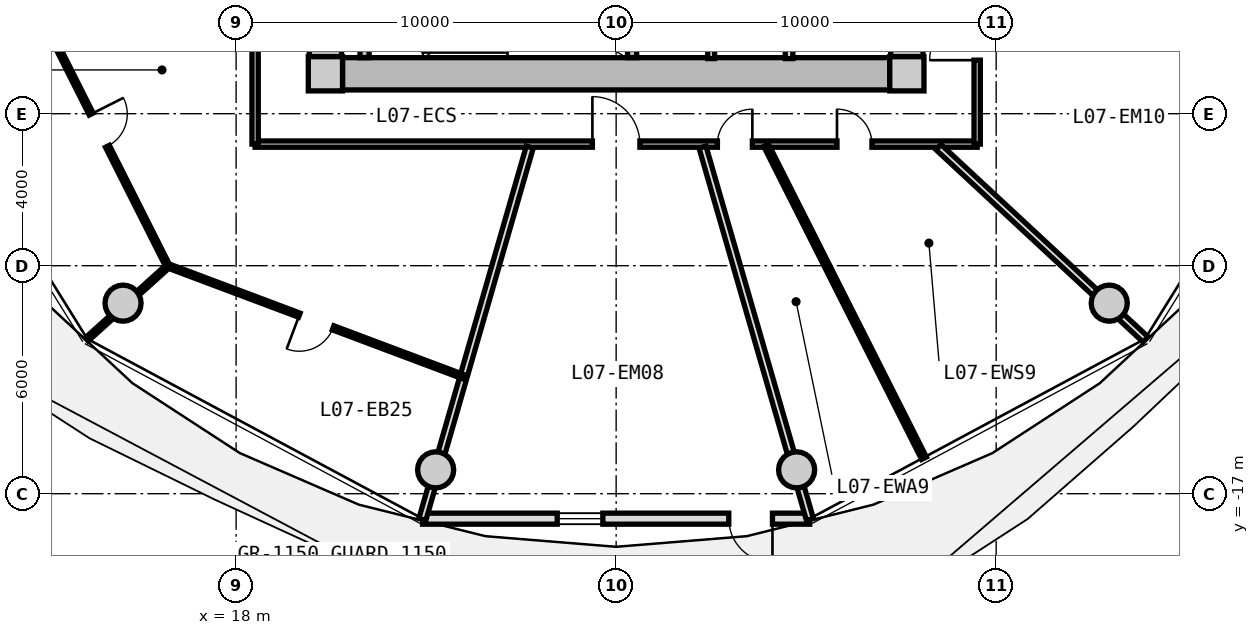
"""IFC4 building model, lengths in metres.
Left out: names, types, materials, properties, quantities, classifications, styles, units other than length and angle.
Written with IfcOpenShell. Run it as: python <this file> out.ifc"""

import sys

from ifc_helpers import new_model, si_unit, direction, frame, frame_2d, origin, origin_2d, place, context, subcontext, project, spatial, rectangle, circle, extrude, source, transform, mapped, element, fill, save


model = new_model("IFC4")
c1 = context("Model", 3, precision=1e-05, world=origin(), true_north=direction((0.0, 1.0)))
c2 = subcontext(c1, "Body", "Model", "MODEL_VIEW")
j1 = project(units=[si_unit("LENGTHUNIT", "METRE"), si_unit("PLANEANGLEUNIT", "RADIAN")], contexts=[c1])
p1 = place(None, origin())
s1 = spatial("IfcSite", under=j1, at=p1, CompositionType="ELEMENT")
p2 = place(p1, origin())
s2 = spatial("IfcBuilding", under=s1, at=p2, CompositionType="ELEMENT")
p3 = place(p2, frame((0.0, 0.0, 27.7)))
s3 = spatial("IfcBuildingStorey", under=s2, at=p3, CompositionType="ELEMENT", Elevation=27.7)
m1 = source(origin(), c2, "Body", "SweptSolid", [
    extrude(rectangle(XDim=0.9, YDim=0.9, at=origin_2d()), origin(), (0.0, 0.0, 1.0), 3.05),
])
for number, where, z_axis, x_axis in (
    (1, (20.35, -5.95, 0.0), (0.0, 0.0, 1.0), (1.0, 0.0, 0.0)),
    (2, (35.65, -5.95, 0.0), (0.0, 0.0, 1.0), (1.0, 0.0, 0.0)),
):
    element("IfcColumn", number, at=place(p3, frame(where, z_axis=z_axis, x_axis=x_axis)), inside=s3, PredefinedType="COLUMN", context=c2, shape_type="MappedRepresentation", body=[
        mapped(m1, transform((0.0, 0.0, 0.0), x_axis=(1.0, 0.0, 0.0), y_axis=(0.0, 1.0, 0.0), z_axis=(0.0, 0.0, 1.0), scale=1.0)),
    ])
m2 = source(origin(), c2, "Body", "SweptSolid", [
    extrude(rectangle(XDim=14.4, YDim=0.85, at=frame_2d((7.2, 0.0))), origin(), (0.0, 0.0, 1.0), 2.79),
])
p4 = place(p3, frame((35.2, -5.95, 0.0), z_axis=(0.0, 0.0, 1.0), x_axis=(-1.0, 0.0, 0.0)))
e3 = element("IfcWall", 3, at=p4, inside=s3, PredefinedType="SHEAR", context=c2, shape_type="MappedRepresentation", body=[
    mapped(m2, transform((0.0, 0.0, 0.0), x_axis=(1.0, 0.0, 0.0), y_axis=(0.0, 1.0, 0.0), z_axis=(0.0, 0.0, 1.0), scale=1.0)),
])
m3 = source(origin(), c2, "Body", "SweptSolid", [
    extrude(rectangle(XDim=11.0, YDim=0.85, at=frame_2d((5.5, 0.0))), origin(), (0.0, 0.0, 1.0), 2.79),
])
p5 = place(p3, frame((20.35, -5.5, 0.0), z_axis=(0.0, 0.0, 1.0), x_axis=(0.0, 1.0, 0.0)))
e4 = element("IfcWall", 4, at=p5, inside=s3, PredefinedType="SHEAR", context=c2, shape_type="MappedRepresentation", body=[
    mapped(m3, transform((0.0, 0.0, 0.0), x_axis=(1.0, 0.0, 0.0), y_axis=(0.0, 1.0, 0.0), z_axis=(0.0, 0.0, 1.0), scale=1.0)),
])
p6 = place(p5, frame((3.8, 0.0, 0.0)))
e5 = element("IfcOpeningElement", 5, at=p6, cuts=e4, PredefinedType="OPENING", context=c2, shape_type="SweptSolid", body=[
    extrude(rectangle(XDim=1.2, YDim=2.15, at=frame_2d((0.6, 1.075))), frame((0.0, 0.435, 0.0), z_axis=(0.0, -1.0, 0.0), x_axis=(1.0, 0.0, 0.0)), (0.0, 0.0, 1.0), 0.87),
])
p7 = place(p3, frame((35.65, 5.5, 0.0), z_axis=(0.0, 0.0, 1.0), x_axis=(0.0, -1.0, 0.0)))
e6 = element("IfcWall", 6, at=p7, inside=s3, PredefinedType="SHEAR", context=c2, shape_type="MappedRepresentation", body=[
    mapped(m3, transform((0.0, 0.0, 0.0), x_axis=(1.0, 0.0, 0.0), y_axis=(0.0, 1.0, 0.0), z_axis=(0.0, 0.0, 1.0), scale=1.0)),
])
p8 = place(p7, frame((5.65, 0.0, 0.0)))
e7 = element("IfcOpeningElement", 7, at=p8, cuts=e6, PredefinedType="OPENING", context=c2, shape_type="SweptSolid", body=[
    extrude(rectangle(XDim=1.2, YDim=2.15, at=frame_2d((0.6, 1.075))), frame((0.0, 0.435, 0.0), z_axis=(0.0, -1.0, 0.0), x_axis=(1.0, 0.0, 0.0)), (0.0, 0.0, 1.0), 0.87),
])
m4 = source(origin(), c2, "Body", "SweptSolid", [
    extrude(circle(Radius=0.475, at=origin_2d()), origin(), (0.0, 0.0, 1.0), 3.05),
])
for number, where, z_axis, x_axis in (
    (8, (15.025, -11.985, 0.0), (0.0, 0.0, 1.0), (1.0, 0.0, 0.0)),
    (9, (23.251, -16.373, 0.0), (0.0, 0.0, 1.0), (1.0, 0.0, 0.0)),
    (10, (32.749, -16.373, 0.0), (0.0, 0.0, 1.0), (1.0, 0.0, 0.0)),
    (11, (40.975, -11.985, 0.0), (0.0, 0.0, 1.0), (1.0, 0.0, 0.0)),
):
    element("IfcColumn", number, at=place(p3, frame(where, z_axis=z_axis, x_axis=x_axis)), inside=s3, PredefinedType="COLUMN", context=c2, shape_type="MappedRepresentation", body=[
        mapped(m4, transform((0.0, 0.0, 0.0), x_axis=(1.0, 0.0, 0.0), y_axis=(0.0, 1.0, 0.0), z_axis=(0.0, 0.0, 1.0), scale=1.0)),
    ])
m5 = source(origin(), c2, "Body", "SweptSolid", [
    extrude(rectangle(XDim=10.187, YDim=0.29, at=frame_2d((5.094, 0.0))), origin(), (0.0, 0.0, 1.0), 2.79),
])
p9 = place(p3, frame((33.094, -17.657, 0.0), z_axis=(0.0, 0.0, 1.0), x_axis=(-1.0, 0.0, 0.0)))
e12 = element("IfcWall", 12, at=p9, inside=s3, PredefinedType="SOLIDWALL", context=c2, shape_type="MappedRepresentation", body=[
    mapped(m5, transform((0.0, 0.0, 0.0), x_axis=(1.0, 0.0, 0.0), y_axis=(0.0, 1.0, 0.0), z_axis=(0.0, 0.0, 1.0), scale=1.0)),
])
p10 = place(p9, frame((0.98, 0.0, 0.0)))
e13 = element("IfcOpeningElement", 13, at=p10, cuts=e12, PredefinedType="OPENING", context=c2, shape_type="SweptSolid", body=[
    extrude(rectangle(XDim=1.15, YDim=2.25, at=frame_2d((0.575, 1.125))), frame((0.0, 0.155, 0.0), z_axis=(0.0, -1.0, 0.0), x_axis=(1.0, 0.0, 0.0)), (0.0, 0.0, 1.0), 0.31),
])
p11 = place(p9, frame((5.444, 0.0, 0.85)))
e14 = element("IfcOpeningElement", 14, at=p11, cuts=e12, PredefinedType="OPENING", context=c2, shape_type="SweptSolid", body=[
    extrude(rectangle(XDim=1.2, YDim=1.5, at=frame_2d((0.6, 0.75))), frame((0.0, 0.155, 0.0), z_axis=(0.0, -1.0, 0.0), x_axis=(1.0, 0.0, 0.0)), (0.0, 0.0, 1.0), 0.31),
])
m6 = source(origin(), c2, "Body", "SweptSolid", [
    extrude(rectangle(XDim=3.075, YDim=0.24, at=frame_2d((1.538, 0.0))), origin(), (0.0, 0.0, 1.0), 2.79),
])
for number, where, z_axis, x_axis in (
    (15, (21.38, -5.525, 0.0), (0.0, 0.0, 1.0), (0.0, 1.0, 0.0)),
    (16, (28.42, -5.525, 0.0), (0.0, 0.0, 1.0), (0.0, 1.0, 0.0)),
):
    element("IfcWall", number, at=place(p3, frame(where, z_axis=z_axis, x_axis=x_axis)), inside=s3, PredefinedType="PARTITIONING", context=c2, shape_type="MappedRepresentation", body=[
        mapped(m6, transform((0.0, 0.0, 0.0), x_axis=(1.0, 0.0, 0.0), y_axis=(0.0, 1.0, 0.0), z_axis=(0.0, 0.0, 1.0), scale=1.0)),
    ])
m7 = source(origin(), c2, "Body", "SweptSolid", [
    extrude(rectangle(XDim=3.8, YDim=0.2, at=frame_2d((1.9, 0.0))), origin(), (0.0, 0.0, 1.0), 2.775),
])
p12 = place(p3, frame((32.55, -5.55, 0.0), z_axis=(0.0, 0.0, 1.0), x_axis=(0.0, 1.0, 0.0)))
e17 = element("IfcWall", 17, at=p12, inside=s3, PredefinedType="PARTITIONING", context=c2, shape_type="MappedRepresentation", body=[
    mapped(m7, transform((0.0, 0.0, 0.0), x_axis=(1.0, 0.0, 0.0), y_axis=(0.0, 1.0, 0.0), z_axis=(0.0, 0.0, 1.0), scale=1.0)),
])
m8 = source(origin(), c2, "Body", "SweptSolid", [
    extrude(rectangle(XDim=3.22, YDim=0.18, at=frame_2d((1.61, 0.0))), origin(), (0.0, 0.0, 1.0), 2.775),
])
p13 = place(p3, frame((30.5, -5.55, 0.0), z_axis=(0.0, 0.0, 1.0), x_axis=(0.0, 1.0, 0.0)))
e18 = element("IfcWall", 18, at=p13, inside=s3, PredefinedType="PARTITIONING", context=c2, shape_type="MappedRepresentation", body=[
    mapped(m8, transform((0.0, 0.0, 0.0), x_axis=(1.0, 0.0, 0.0), y_axis=(0.0, 1.0, 0.0), z_axis=(0.0, 0.0, 1.0), scale=1.0)),
])
m9 = source(origin(), c2, "Body", "SweptSolid", [
    extrude(rectangle(XDim=19.0, YDim=0.165, at=frame_2d((9.5, 0.0))), origin(), (0.0, 0.0, 1.0), 2.775),
])
p14 = place(p3, frame((37.5, -7.8, 0.0), z_axis=(0.0, 0.0, 1.0), x_axis=(-1.0, 0.0, 0.0)))
e19 = element("IfcWall", 19, at=p14, inside=s3, PredefinedType="PARTITIONING", context=c2, shape_type="MappedRepresentation", body=[
    mapped(m9, transform((0.0, 0.0, 0.0), x_axis=(1.0, 0.0, 0.0), y_axis=(0.0, 1.0, 0.0), z_axis=(0.0, 0.0, 1.0), scale=1.0)),
])
p15 = place(p14, frame((8.875, 0.0, 0.0)))
e20 = element("IfcOpeningElement", 20, at=p15, cuts=e19, PredefinedType="OPENING", context=c2, shape_type="SweptSolid", body=[
    extrude(rectangle(XDim=1.25, YDim=2.2, at=frame_2d((0.625, 1.1))), frame((0.0, 0.093, 0.0), z_axis=(0.0, -1.0, 0.0), x_axis=(1.0, 0.0, 0.0)), (0.0, 0.0, 1.0), 0.185),
])
p16 = place(p14, frame((5.915, 0.0, 0.0)))
e21 = element("IfcOpeningElement", 21, at=p16, cuts=e19, PredefinedType="OPENING", context=c2, shape_type="SweptSolid", body=[
    extrude(rectangle(XDim=0.92, YDim=2.1, at=frame_2d((0.46, 1.05))), frame((0.0, 0.093, 0.0), z_axis=(0.0, -1.0, 0.0), x_axis=(1.0, 0.0, 0.0)), (0.0, 0.0, 1.0), 0.185),
])
p17 = place(p14, frame((2.769, 0.0, 0.0)))
e22 = element("IfcOpeningElement", 22, at=p17, cuts=e19, PredefinedType="OPENING", context=c2, shape_type="SweptSolid", body=[
    extrude(rectangle(XDim=0.92, YDim=2.1, at=frame_2d((0.46, 1.05))), frame((0.0, 0.093, 0.0), z_axis=(0.0, -1.0, 0.0), x_axis=(1.0, 0.0, 0.0)), (0.0, 0.0, 1.0), 0.185),
])
m10 = source(origin(), c2, "Body", "SweptSolid", [
    extrude(rectangle(XDim=15.6, YDim=0.165, at=frame_2d((7.8, 0.0))), origin(), (0.0, 0.0, 1.0), 2.775),
])
p18 = place(p3, frame((18.5, -7.8, 0.0), z_axis=(0.0, 0.0, 1.0), x_axis=(0.0, 1.0, 0.0)))
e23 = element("IfcWall", 23, at=p18, inside=s3, PredefinedType="PARTITIONING", context=c2, shape_type="MappedRepresentation", body=[
    mapped(m10, transform((0.0, 0.0, 0.0), x_axis=(1.0, 0.0, 0.0), y_axis=(0.0, 1.0, 0.0), z_axis=(0.0, 0.0, 1.0), scale=1.0)),
])
p19 = place(p18, frame((12.241, 0.0, 0.0)))
e24 = element("IfcOpeningElement", 24, at=p19, cuts=e23, PredefinedType="OPENING", context=c2, shape_type="SweptSolid", body=[
    extrude(rectangle(XDim=1.05, YDim=2.15, at=frame_2d((0.525, 1.075))), frame((0.0, 0.093, 0.0), z_axis=(0.0, -1.0, 0.0), x_axis=(1.0, 0.0, 0.0)), (0.0, 0.0, 1.0), 0.185),
])
p20 = place(p18, frame((3.63, 0.0, 0.0)))
e25 = element("IfcOpeningElement", 25, at=p20, cuts=e23, PredefinedType="OPENING", context=c2, shape_type="SweptSolid", body=[
    extrude(rectangle(XDim=1.05, YDim=2.15, at=frame_2d((0.525, 1.075))), frame((0.0, 0.093, 0.0), z_axis=(0.0, -1.0, 0.0), x_axis=(1.0, 0.0, 0.0)), (0.0, 0.0, 1.0), 0.185),
])
p21 = place(p3, frame((37.5, 7.8, 0.0), z_axis=(0.0, 0.0, 1.0), x_axis=(0.0, -1.0, 0.0)))
e26 = element("IfcWall", 26, at=p21, inside=s3, PredefinedType="PARTITIONING", context=c2, shape_type="MappedRepresentation", body=[
    mapped(m10, transform((0.0, 0.0, 0.0), x_axis=(1.0, 0.0, 0.0), y_axis=(0.0, 1.0, 0.0), z_axis=(0.0, 0.0, 1.0), scale=1.0)),
])
p22 = place(p21, frame((12.141, 0.0, 0.0)))
e27 = element("IfcOpeningElement", 27, at=p22, cuts=e26, PredefinedType="OPENING", context=c2, shape_type="SweptSolid", body=[
    extrude(rectangle(XDim=1.25, YDim=2.2, at=frame_2d((0.625, 1.1))), frame((0.0, 0.093, 0.0), z_axis=(0.0, -1.0, 0.0), x_axis=(1.0, 0.0, 0.0)), (0.0, 0.0, 1.0), 0.185),
])
p23 = place(p21, frame((6.196, 0.0, 0.0)))
e28 = element("IfcOpeningElement", 28, at=p23, cuts=e26, PredefinedType="OPENING", context=c2, shape_type="SweptSolid", body=[
    extrude(rectangle(XDim=1.05, YDim=2.15, at=frame_2d((0.525, 1.075))), frame((0.0, 0.093, 0.0), z_axis=(0.0, -1.0, 0.0), x_axis=(1.0, 0.0, 0.0)), (0.0, 0.0, 1.0), 0.185),
])
p24 = place(p21, frame((1.092, 0.0, 0.0)))
e29 = element("IfcOpeningElement", 29, at=p24, cuts=e26, PredefinedType="OPENING", context=c2, shape_type="SweptSolid", body=[
    extrude(rectangle(XDim=1.05, YDim=2.15, at=frame_2d((0.525, 1.075))), frame((0.0, 0.093, 0.0), z_axis=(0.0, -1.0, 0.0), x_axis=(1.0, 0.0, 0.0)), (0.0, 0.0, 1.0), 0.185),
])
m11 = source(origin(), c2, "Body", "SweptSolid", [
    extrude(rectangle(XDim=10.196, YDim=0.19, at=frame_2d((5.098, 0.0))), origin(), (0.0, 0.0, 1.0), 2.225),
])
p25 = place(p3, frame((25.727, -7.88, 0.0), z_axis=(0.0, 0.0, 1.0), x_axis=(-0.277136420347, -0.960830580549, 0.0)))
e30 = element("IfcWall", 30, at=p25, inside=s3, PredefinedType="PARTITIONING", context=c2, shape_type="MappedRepresentation", body=[
    mapped(m11, transform((0.0, 0.0, 0.0), x_axis=(1.0, 0.0, 0.0), y_axis=(0.0, 1.0, 0.0), z_axis=(0.0, 0.0, 1.0), scale=1.0)),
])
m12 = source(origin(), c2, "Body", "SweptSolid", [
    extrude(rectangle(XDim=8.018, YDim=0.115, at=frame_2d((4.009, 0.0))), origin(), (0.0, 0.0, 1.0), 2.775),
])
p26 = place(p3, frame((12.596, -3.854, 0.0), z_axis=(0.0, 0.0, 1.0), x_axis=(0.450134355233, -0.89296084026, 0.0)))
e31 = element("IfcWall", 31, at=p26, inside=s3, PredefinedType="PARTITIONING", context=c2, shape_type="MappedRepresentation", body=[
    mapped(m12, transform((0.0, 0.0, 0.0), x_axis=(1.0, 0.0, 0.0), y_axis=(0.0, 1.0, 0.0), z_axis=(0.0, 0.0, 1.0), scale=1.0)),
])
p27 = place(p26, frame((3.534, 0.0, 0.0)))
e32 = element("IfcOpeningElement", 32, at=p27, cuts=e31, PredefinedType="OPENING", context=c2, shape_type="SweptSolid", body=[
    extrude(rectangle(XDim=0.95, YDim=2.1, at=frame_2d((0.475, 1.05))), frame((0.0, 0.067, 0.0), z_axis=(0.0, -1.0, 0.0), x_axis=(1.0, 0.0, 0.0)), (0.0, 0.0, 1.0), 0.135),
])
m13 = source(origin(), c2, "Body", "SweptSolid", [
    extrude(rectangle(XDim=8.32, YDim=0.115, at=frame_2d((4.16, 0.0))), origin(), (0.0, 0.0, 1.0), 2.775),
])
p28 = place(p3, frame((16.214, -11.006, 0.0), z_axis=(0.0, 0.0, 1.0), x_axis=(0.936180763098, -0.351518959382, 0.0)))
e33 = element("IfcWall", 33, at=p28, inside=s3, PredefinedType="PARTITIONING", context=c2, shape_type="MappedRepresentation", body=[
    mapped(m13, transform((0.0, 0.0, 0.0), x_axis=(1.0, 0.0, 0.0), y_axis=(0.0, 1.0, 0.0), z_axis=(0.0, 0.0, 1.0), scale=1.0)),
])
p29 = place(p28, frame((3.685, 0.0, 0.0)))
e34 = element("IfcOpeningElement", 34, at=p29, cuts=e33, PredefinedType="OPENING", context=c2, shape_type="SweptSolid", body=[
    extrude(rectangle(XDim=0.95, YDim=2.1, at=frame_2d((0.475, 1.05))), frame((0.0, 0.067, 0.0), z_axis=(0.0, -1.0, 0.0), x_axis=(1.0, 0.0, 0.0)), (0.0, 0.0, 1.0), 0.135),
])
m14 = source(origin(), c2, "Body", "SweptSolid", [
    extrude(rectangle(XDim=2.887, YDim=0.115, at=frame_2d((1.444, 0.0))), origin(), (0.0, 0.0, 1.0), 2.225),
])
p30 = place(p3, frame((16.214, -11.006, 0.0), z_axis=(0.0, 0.0, 1.0), x_axis=(-0.742448503307, -0.669903142205, 0.0)))
e35 = element("IfcWall", 35, at=p30, inside=s3, PredefinedType="PARTITIONING", context=c2, shape_type="MappedRepresentation", body=[
    mapped(m14, transform((0.0, 0.0, 0.0), x_axis=(1.0, 0.0, 0.0), y_axis=(0.0, 1.0, 0.0), z_axis=(0.0, 0.0, 1.0), scale=1.0)),
])
p31 = place(p3, frame((30.273, -7.88, 0.0), z_axis=(0.0, 0.0, 1.0), x_axis=(0.277136420347, -0.960830580549, 0.0)))
e36 = element("IfcWall", 36, at=p31, inside=s3, PredefinedType="PARTITIONING", context=c2, shape_type="MappedRepresentation", body=[
    mapped(m11, transform((0.0, 0.0, 0.0), x_axis=(1.0, 0.0, 0.0), y_axis=(0.0, 1.0, 0.0), z_axis=(0.0, 0.0, 1.0), scale=1.0)),
])
m15 = source(origin(), c2, "Body", "SweptSolid", [
    extrude(rectangle(XDim=7.435, YDim=0.19, at=frame_2d((3.717, 0.0))), origin(), (0.0, 0.0, 1.0), 2.225),
])
p32 = place(p3, frame((36.483, -7.88, 0.0), z_axis=(0.0, 0.0, 1.0), x_axis=(0.732651956848, -0.680603489652, 0.0)))
e37 = element("IfcWall", 37, at=p32, inside=s3, PredefinedType="PARTITIONING", context=c2, shape_type="MappedRepresentation", body=[
    mapped(m15, transform((0.0, 0.0, 0.0), x_axis=(1.0, 0.0, 0.0), y_axis=(0.0, 1.0, 0.0), z_axis=(0.0, 0.0, 1.0), scale=1.0)),
])
m16 = source(origin(), c2, "Body", "SweptSolid", [
    extrude(rectangle(XDim=9.225, YDim=0.14, at=frame_2d((4.613, 0.0))), origin(), (0.0, 0.0, 1.0), 2.775),
])
p33 = place(p3, frame((31.946, -7.83, 0.0), z_axis=(0.0, 0.0, 1.0), x_axis=(0.450460543767, -0.892796336523, 0.0)))
e38 = element("IfcWall", 38, at=p33, inside=s3, PredefinedType="PARTITIONING", context=c2, shape_type="MappedRepresentation", body=[
    mapped(m16, transform((0.0, 0.0, 0.0), x_axis=(1.0, 0.0, 0.0), y_axis=(0.0, 1.0, 0.0), z_axis=(0.0, 0.0, 1.0), scale=1.0)),
])
m17 = source(origin(), c2, "Body", "SweptSolid", [
    extrude(rectangle(XDim=1.15, YDim=2.25, at=frame_2d((0.575, 1.125))), frame((0.0, 0.025, 0.0), z_axis=(0.0, -1.0, 0.0), x_axis=(1.0, 0.0, 0.0)), (0.0, 0.0, 1.0), 0.05),
])
p34 = place(p10, origin())
e39 = element("IfcDoor", 39, at=p34, inside=s3, OperationType="SINGLE_SWING_LEFT", PredefinedType="DOOR", context=c2, shape_type="MappedRepresentation", body=[
    mapped(m17, transform((0.0, 0.0, 0.0), x_axis=(1.0, 0.0, 0.0), y_axis=(0.0, 1.0, 0.0), z_axis=(0.0, 0.0, 1.0), scale=1.0)),
])
fill(e13, e39)
m18 = source(origin(), c2, "Body", "SweptSolid", [
    extrude(rectangle(XDim=1.2, YDim=1.5, at=frame_2d((0.6, 0.75))), frame((0.0, 0.03, 0.0), z_axis=(0.0, -1.0, 0.0), x_axis=(1.0, 0.0, 0.0)), (0.0, 0.0, 1.0), 0.06),
])
p35 = place(p11, origin())
e40 = element("IfcWindow", 40, at=p35, inside=s3, PartitioningType="SINGLE_PANEL", PredefinedType="WINDOW", context=c2, shape_type="MappedRepresentation", body=[
    mapped(m18, transform((0.0, 0.0, 0.0), x_axis=(1.0, 0.0, 0.0), y_axis=(0.0, 1.0, 0.0), z_axis=(0.0, 0.0, 1.0), scale=1.0)),
])
fill(e14, e40)
m19 = source(origin(), c2, "Body", "SweptSolid", [
    extrude(rectangle(XDim=0.95, YDim=2.1, at=frame_2d((0.475, 1.05))), frame((0.0, 0.025, 0.0), z_axis=(0.0, -1.0, 0.0), x_axis=(1.0, 0.0, 0.0)), (0.0, 0.0, 1.0), 0.05),
])
p36 = place(p27, origin())
e41 = element("IfcDoor", 41, at=p36, inside=s3, OperationType="SINGLE_SWING_LEFT", PredefinedType="DOOR", context=c2, shape_type="MappedRepresentation", body=[
    mapped(m19, transform((0.0, 0.0, 0.0), x_axis=(1.0, 0.0, 0.0), y_axis=(0.0, 1.0, 0.0), z_axis=(0.0, 0.0, 1.0), scale=1.0)),
])
fill(e32, e41)
p37 = place(p29, frame((0.95, 0.0, 0.0), z_axis=(0.0, 0.0, 1.0), x_axis=(-1.0, 0.0, 0.0)))
e42 = element("IfcDoor", 42, at=p37, inside=s3, OperationType="SINGLE_SWING_RIGHT", PredefinedType="DOOR", context=c2, shape_type="MappedRepresentation", body=[
    mapped(m19, transform((0.0, 0.0, 0.0), x_axis=(1.0, 0.0, 0.0), y_axis=(0.0, 1.0, 0.0), z_axis=(0.0, 0.0, 1.0), scale=1.0)),
])
fill(e34, e42)
m20 = source(origin(), c2, "Body", "SweptSolid", [
    extrude(rectangle(XDim=1.25, YDim=2.2, at=frame_2d((0.625, 1.1))), frame((0.0, 0.025, 0.0), z_axis=(0.0, -1.0, 0.0), x_axis=(1.0, 0.0, 0.0)), (0.0, 0.0, 1.0), 0.05),
])
p38 = place(p15, frame((1.25, 0.0, 0.0), z_axis=(0.0, 0.0, 1.0), x_axis=(-1.0, 0.0, 0.0)))
e43 = element("IfcDoor", 43, at=p38, inside=s3, OperationType="SINGLE_SWING_LEFT", PredefinedType="DOOR", context=c2, shape_type="MappedRepresentation", body=[
    mapped(m20, transform((0.0, 0.0, 0.0), x_axis=(1.0, 0.0, 0.0), y_axis=(0.0, 1.0, 0.0), z_axis=(0.0, 0.0, 1.0), scale=1.0)),
])
fill(e20, e43)
m21 = source(origin(), c2, "Body", "SweptSolid", [
    extrude(rectangle(XDim=0.92, YDim=2.1, at=frame_2d((0.46, 1.05))), frame((0.0, 0.025, 0.0), z_axis=(0.0, -1.0, 0.0), x_axis=(1.0, 0.0, 0.0)), (0.0, 0.0, 1.0), 0.05),
])
p39 = place(p16, frame((0.92, 0.0, 0.0), z_axis=(0.0, 0.0, 1.0), x_axis=(-1.0, 0.0, 0.0)))
e44 = element("IfcDoor", 44, at=p39, inside=s3, OperationType="SINGLE_SWING_RIGHT", PredefinedType="DOOR", context=c2, shape_type="MappedRepresentation", body=[
    mapped(m21, transform((0.0, 0.0, 0.0), x_axis=(1.0, 0.0, 0.0), y_axis=(0.0, 1.0, 0.0), z_axis=(0.0, 0.0, 1.0), scale=1.0)),
])
fill(e21, e44)
p40 = place(p17, frame((0.92, 0.0, 0.0), z_axis=(0.0, 0.0, 1.0), x_axis=(-1.0, 0.0, 0.0)))
e45 = element("IfcDoor", 45, at=p40, inside=s3, OperationType="SINGLE_SWING_LEFT", PredefinedType="DOOR", context=c2, shape_type="MappedRepresentation", body=[
    mapped(m21, transform((0.0, 0.0, 0.0), x_axis=(1.0, 0.0, 0.0), y_axis=(0.0, 1.0, 0.0), z_axis=(0.0, 0.0, 1.0), scale=1.0)),
])
fill(e22, e45)
p41 = place(p22, frame((1.25, 0.0, 0.0), z_axis=(0.0, 0.0, 1.0), x_axis=(-1.0, 0.0, 0.0)))
e46 = element("IfcDoor", 46, at=p41, inside=s3, OperationType="SINGLE_SWING_LEFT", PredefinedType="DOOR", context=c2, shape_type="MappedRepresentation", body=[
    mapped(m20, transform((0.0, 0.0, 0.0), x_axis=(1.0, 0.0, 0.0), y_axis=(0.0, 1.0, 0.0), z_axis=(0.0, 0.0, 1.0), scale=1.0)),
])
fill(e27, e46)
save(model, sys.argv[1])
